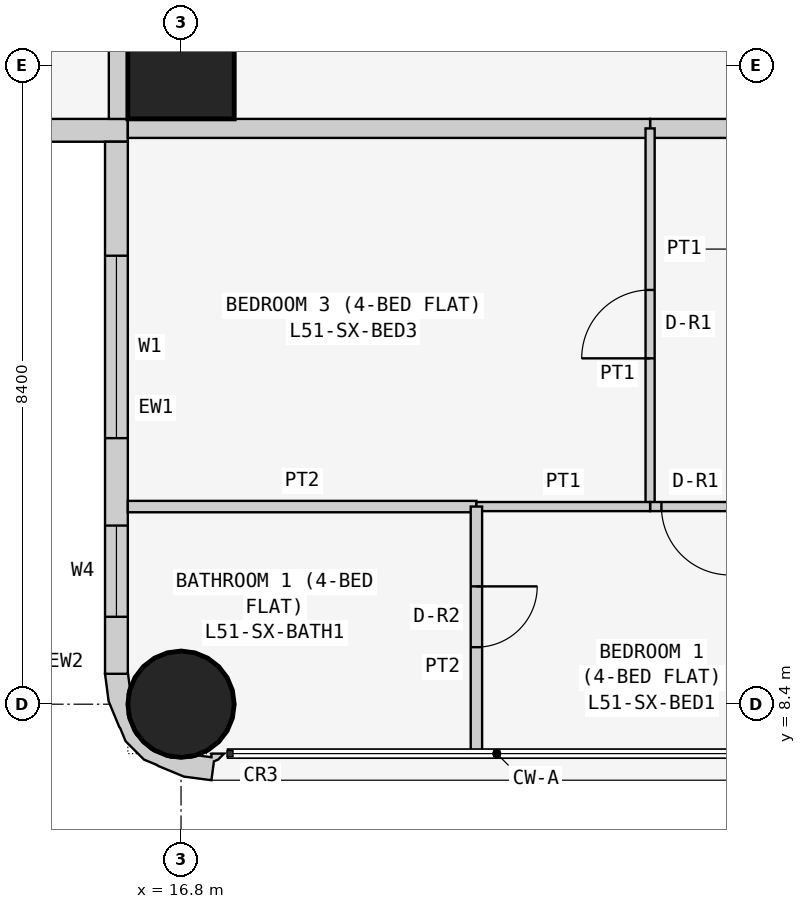
"""IFC4 building model, lengths in metres.
Left out: names, types, materials, properties, quantities, classifications, styles, units other than length and angle.
Written with IfcOpenShell. Run it as: python <this file> out.ifc"""

import sys

from ifc_helpers import new_model, si_unit, direction, frame, frame_2d, origin, origin_2d, place, context, subcontext, project, spatial, polyline, rectangle, circle, outline, extrude, element, fill, save


model = new_model("IFC4")
c1 = context("Model", 3, precision=1e-05, world=origin(), true_north=direction((0.0, 1.0)))
c2 = subcontext(c1, "Body", "Model", "MODEL_VIEW")
j1 = project(units=[si_unit("LENGTHUNIT", "METRE"), si_unit("PLANEANGLEUNIT", "RADIAN")], contexts=[c1])
p1 = place(None, origin())
s1 = spatial("IfcSite", under=j1, at=p1, CompositionType="ELEMENT")
p2 = place(p1, origin())
s2 = spatial("IfcBuilding", under=s1, at=p2, CompositionType="ELEMENT")
p3 = place(p2, frame((0.0, 0.0, 197.7)))
s3 = spatial("IfcBuildingStorey", under=s2, at=p3, CompositionType="ELEMENT", Elevation=197.7)
p4 = place(p3, frame((16.8, 8.4, 0.0), z_axis=(0.0, 0.0, 1.0), x_axis=(1.0, 0.0, 0.0)))
e1 = element("IfcColumn", 1, at=p4, inside=s3, PredefinedType="COLUMN", context=c2, shape_type="SweptSolid", body=[
    extrude(circle(Radius=0.7, at=origin_2d()), origin(), (0.0, 0.0, 1.0), 3.6),
])
p5 = place(p3, frame((16.8, 16.8, 0.0), z_axis=(0.0, 0.0, 1.0), x_axis=(1.0, 0.0, 0.0)))
e2 = element("IfcColumn", 2, at=p5, inside=s3, PredefinedType="COLUMN", context=c2, shape_type="SweptSolid", body=[
    extrude(rectangle(XDim=1.4, YDim=1.4, at=origin_2d()), origin(), (0.0, 0.0, 1.0), 3.6),
])
p6 = place(p3, frame((0.4, 15.95, 0.0), z_axis=(0.0, 0.0, 1.0), x_axis=(1.0, 0.0, 0.0)))
e3 = element("IfcWall", 3, at=p6, inside=s3, PredefinedType="SOLIDWALL", context=c2, shape_type="SweptSolid", body=[
    extrude(rectangle(XDim=15.7, YDim=0.3, at=frame_2d((7.85, 0.0))), origin(), (0.0, 0.0, 1.0), 3.45),
])
p7 = place(p6, frame((12.4, 0.0, 0.9)))
e4 = element("IfcOpeningElement", 4, at=p7, cuts=e3, PredefinedType="OPENING", context=c2, shape_type="SweptSolid", body=[
    extrude(rectangle(XDim=1.8, YDim=1.5, at=frame_2d((0.9, 0.75))), frame((0.0, 0.16, 0.0), z_axis=(0.0, -1.0, 0.0), x_axis=(1.0, 0.0, 0.0)), (0.0, 0.0, 1.0), 0.32),
])
p8 = place(p6, frame((9.55, 0.0, 1.5)))
e5 = element("IfcOpeningElement", 5, at=p8, cuts=e3, PredefinedType="OPENING", context=c2, shape_type="SweptSolid", body=[
    extrude(rectangle(XDim=0.9, YDim=0.7, at=frame_2d((0.45, 0.35))), frame((0.0, 0.16, 0.0), z_axis=(0.0, -1.0, 0.0), x_axis=(1.0, 0.0, 0.0)), (0.0, 0.0, 1.0), 0.32),
])
p9 = place(p6, frame((5.1, 0.0, 0.9)))
e6 = element("IfcOpeningElement", 6, at=p9, cuts=e3, PredefinedType="OPENING", context=c2, shape_type="SweptSolid", body=[
    extrude(rectangle(XDim=1.8, YDim=1.5, at=frame_2d((0.9, 0.75))), frame((0.0, 0.16, 0.0), z_axis=(0.0, -1.0, 0.0), x_axis=(1.0, 0.0, 0.0)), (0.0, 0.0, 1.0), 0.32),
])
p10 = place(p6, frame((2.0, 0.0, 0.0)))
e7 = element("IfcOpeningElement", 7, at=p10, cuts=e3, PredefinedType="OPENING", context=c2, shape_type="SweptSolid", body=[
    extrude(rectangle(XDim=0.9, YDim=2.4, at=frame_2d((0.45, 1.2))), frame((0.0, 0.16, 0.0), z_axis=(0.0, -1.0, 0.0), x_axis=(1.0, 0.0, 0.0)), (0.0, 0.0, 1.0), 0.32),
])
p11 = place(p6, frame((0.7, 0.0, 0.9)))
e8 = element("IfcOpeningElement", 8, at=p11, cuts=e3, PredefinedType="OPENING", context=c2, shape_type="SweptSolid", body=[
    extrude(rectangle(XDim=1.2, YDim=1.5, at=frame_2d((0.6, 0.75))), frame((0.0, 0.16, 0.0), z_axis=(0.0, -1.0, 0.0), x_axis=(1.0, 0.0, 0.0)), (0.0, 0.0, 1.0), 0.32),
])
p12 = place(p3, frame((15.95, 15.8, 0.0), z_axis=(0.0, 0.0, 1.0), x_axis=(0.0, -1.0, 0.0)))
e9 = element("IfcWall", 9, at=p12, inside=s3, PredefinedType="SOLIDWALL", context=c2, shape_type="SweptSolid", body=[
    extrude(rectangle(XDim=7.0, YDim=0.3, at=frame_2d((3.5, 0.0))), origin(), (0.0, 0.0, 1.0), 3.45),
])
p13 = place(p12, frame((1.5, 0.0, 0.9)))
e10 = element("IfcOpeningElement", 10, at=p13, cuts=e9, PredefinedType="OPENING", context=c2, shape_type="SweptSolid", body=[
    extrude(rectangle(XDim=2.4, YDim=1.5, at=frame_2d((1.2, 0.75))), frame((0.0, 0.16, 0.0), z_axis=(0.0, -1.0, 0.0), x_axis=(1.0, 0.0, 0.0)), (0.0, 0.0, 1.0), 0.32),
])
p14 = place(p12, frame((5.05, 0.0, 0.9)))
e11 = element("IfcOpeningElement", 11, at=p14, cuts=e9, PredefinedType="OPENING", context=c2, shape_type="SweptSolid", body=[
    extrude(rectangle(XDim=1.2, YDim=1.5, at=frame_2d((0.6, 0.75))), frame((0.0, 0.16, 0.0), z_axis=(0.0, -1.0, 0.0), x_axis=(1.0, 0.0, 0.0)), (0.0, 0.0, 1.0), 0.32),
])
p15 = place(p3, frame((16.076, 8.69, 0.0), z_axis=(0.0, 0.0, 1.0), x_axis=(-0.439933741929, -0.898030234854, 0.0)))
e12 = element("IfcWall", 12, at=p15, inside=s3, PredefinedType="SOLIDWALL", context=c2, shape_type="SweptSolid", body=[
    extrude(outline(polyline([(0.664, 1.577), (0.426, 1.497), (0.382, 1.536), (0.276, 1.572), (0.349, 1.423), (0.392, 1.444), (0.453, 1.261), (0.51, 1.211), (0.632, 0.961), (0.65, 0.683), (0.56, 0.419), (0.375, 0.21), (0.125, 0.087), (0.05, 0.082), (-0.127, -0.035), (-0.145, -0.044), (0.022, -0.296), (0.327, -0.094), (0.568, 0.18), (0.578, 0.199), (0.7, 0.337), (0.811, 0.661), (0.799, 0.846), (0.803, 0.866), (0.78, 1.231), (0.664, 1.577)])), origin(), (0.0, 0.0, 1.0), 3.45),
])
p16 = place(p3, frame((24.171, 15.975, 0.0), z_axis=(0.0, 0.0, 1.0), x_axis=(-1.0, 0.0, 0.0)))
e13 = element("IfcWall", 13, at=p16, inside=s3, PredefinedType="PARTITIONING", context=c2, shape_type="SweptSolid", body=[
    extrude(rectangle(XDim=1.2, YDim=0.25, at=frame_2d((0.6, 0.0))), origin(), (0.0, 0.0, 1.0), 3.45),
])
for number, where, z_axis, x_axis in (
    (14, (22.971, 15.975, 0.0), (0.0, 0.0, 1.0), (-1.0, 0.0, 0.0)),
    (15, (15.975, 16.1, 0.0), (0.0, 0.0, 1.0), (0.0, 1.0, 0.0)),
):
    element("IfcWall", number, at=place(p3, frame(where, z_axis=z_axis, x_axis=x_axis)), inside=s3, PredefinedType="PARTITIONING", context=c2, shape_type="SweptSolid", body=[
        extrude(rectangle(XDim=6.871, YDim=0.25, at=frame_2d((3.436, 0.0))), origin(), (0.0, 0.0, 1.0), 3.45),
    ])
p17 = place(p3, frame((22.971, 11.0, 0.0), z_axis=(0.0, 0.0, 1.0), x_axis=(0.0, 1.0, 0.0)))
e16 = element("IfcWall", 16, at=p17, inside=s3, PredefinedType="PARTITIONING", context=c2, shape_type="SweptSolid", body=[
    extrude(rectangle(XDim=4.975, YDim=0.12, at=frame_2d((2.488, 0.0))), origin(), (0.0, 0.0, 1.0), 3.45),
])
p18 = place(p17, frame((1.95, 0.0, 0.0)))
e17 = element("IfcOpeningElement", 17, at=p18, cuts=e16, PredefinedType="OPENING", context=c2, shape_type="SweptSolid", body=[
    extrude(rectangle(XDim=0.9, YDim=2.1, at=frame_2d((0.45, 1.05))), frame((0.0, 0.07, 0.0), z_axis=(0.0, -1.0, 0.0), x_axis=(1.0, 0.0, 0.0)), (0.0, 0.0, 1.0), 0.14),
])
p19 = place(p3, frame((24.171, 11.0, 0.0), z_axis=(0.0, 0.0, 1.0), x_axis=(-1.0, 0.0, 0.0)))
e18 = element("IfcWall", 18, at=p19, inside=s3, PredefinedType="PARTITIONING", context=c2, shape_type="SweptSolid", body=[
    extrude(rectangle(XDim=1.2, YDim=0.12, at=frame_2d((0.6, 0.0))), origin(), (0.0, 0.0, 1.0), 3.45),
])
p20 = place(p19, frame((0.151, 0.0, 0.0)))
e19 = element("IfcOpeningElement", 19, at=p20, cuts=e18, PredefinedType="OPENING", context=c2, shape_type="SweptSolid", body=[
    extrude(rectangle(XDim=0.9, YDim=2.1, at=frame_2d((0.45, 1.05))), frame((0.0, 0.07, 0.0), z_axis=(0.0, -1.0, 0.0), x_axis=(1.0, 0.0, 0.0)), (0.0, 0.0, 1.0), 0.14),
])
p21 = place(p3, frame((16.1, 11.0, 0.0), z_axis=(0.0, 0.0, 1.0), x_axis=(1.0, 0.0, 0.0)))
e20 = element("IfcWall", 20, at=p21, inside=s3, PredefinedType="PARTITIONING", context=c2, shape_type="SweptSolid", body=[
    extrude(rectangle(XDim=4.586, YDim=0.15, at=frame_2d((2.293, 0.0))), origin(), (0.0, 0.0, 1.0), 3.45),
])
p22 = place(p3, frame((20.686, 11.0, 0.0), z_axis=(0.0, 0.0, 1.0), x_axis=(1.0, 0.0, 0.0)))
e21 = element("IfcWall", 21, at=p22, inside=s3, PredefinedType="PARTITIONING", context=c2, shape_type="SweptSolid", body=[
    extrude(rectangle(XDim=2.285, YDim=0.12, at=frame_2d((1.143, 0.0))), origin(), (0.0, 0.0, 1.0), 3.45),
])
p23 = place(p3, frame((20.686, 7.75, 0.0), z_axis=(0.0, 0.0, 1.0), x_axis=(0.0, 1.0, 0.0)))
e22 = element("IfcWall", 22, at=p23, inside=s3, PredefinedType="PARTITIONING", context=c2, shape_type="SweptSolid", body=[
    extrude(rectangle(XDim=3.25, YDim=0.15, at=frame_2d((1.625, 0.0))), origin(), (0.0, 0.0, 1.0), 3.45),
])
p24 = place(p23, frame((1.4, 0.0, 0.0)))
e23 = element("IfcOpeningElement", 23, at=p24, cuts=e22, PredefinedType="OPENING", context=c2, shape_type="SweptSolid", body=[
    extrude(rectangle(XDim=0.8, YDim=2.1, at=frame_2d((0.4, 1.05))), frame((0.0, 0.085, 0.0), z_axis=(0.0, -1.0, 0.0), x_axis=(1.0, 0.0, 0.0)), (0.0, 0.0, 1.0), 0.17),
])
p25 = place(p13, origin())
e24 = element("IfcWindow", 24, at=p25, inside=s3, PartitioningType="SINGLE_PANEL", PredefinedType="WINDOW", context=c2, shape_type="SweptSolid", body=[
    extrude(rectangle(XDim=2.4, YDim=1.5, at=frame_2d((1.2, 0.75))), frame((0.0, 0.03, 0.0), z_axis=(0.0, -1.0, 0.0), x_axis=(1.0, 0.0, 0.0)), (0.0, 0.0, 1.0), 0.06),
])
fill(e10, e24)
p26 = place(p14, origin())
e25 = element("IfcWindow", 25, at=p26, inside=s3, PartitioningType="SINGLE_PANEL", PredefinedType="WINDOW", context=c2, shape_type="SweptSolid", body=[
    extrude(rectangle(XDim=1.2, YDim=1.5, at=frame_2d((0.6, 0.75))), frame((0.0, 0.03, 0.0), z_axis=(0.0, -1.0, 0.0), x_axis=(1.0, 0.0, 0.0)), (0.0, 0.0, 1.0), 0.06),
])
fill(e11, e25)
p27 = place(p18, origin())
e26 = element("IfcDoor", 26, at=p27, inside=s3, OperationType="SINGLE_SWING_LEFT", PredefinedType="DOOR", context=c2, shape_type="SweptSolid", body=[
    extrude(rectangle(XDim=0.9, YDim=2.1, at=frame_2d((0.45, 1.05))), frame((0.0, 0.025, 0.0), z_axis=(0.0, -1.0, 0.0), x_axis=(1.0, 0.0, 0.0)), (0.0, 0.0, 1.0), 0.05),
])
fill(e17, e26)
p28 = place(p20, origin())
e27 = element("IfcDoor", 27, at=p28, inside=s3, OperationType="SINGLE_SWING_LEFT", PredefinedType="DOOR", context=c2, shape_type="SweptSolid", body=[
    extrude(rectangle(XDim=0.9, YDim=2.1, at=frame_2d((0.45, 1.05))), frame((0.0, 0.025, 0.0), z_axis=(0.0, -1.0, 0.0), x_axis=(1.0, 0.0, 0.0)), (0.0, 0.0, 1.0), 0.05),
])
fill(e19, e27)
p29 = place(p24, frame((0.8, 0.0, 0.0), z_axis=(0.0, 0.0, 1.0), x_axis=(-1.0, 0.0, 0.0)))
e28 = element("IfcDoor", 28, at=p29, inside=s3, OperationType="SINGLE_SWING_LEFT", PredefinedType="DOOR", context=c2, shape_type="SweptSolid", body=[
    extrude(rectangle(XDim=0.8, YDim=2.1, at=frame_2d((0.4, 1.05))), frame((0.0, 0.025, 0.0), z_axis=(0.0, -1.0, 0.0), x_axis=(1.0, 0.0, 0.0)), (0.0, 0.0, 1.0), 0.05),
])
fill(e23, e28)
save(model, sys.argv[1])
